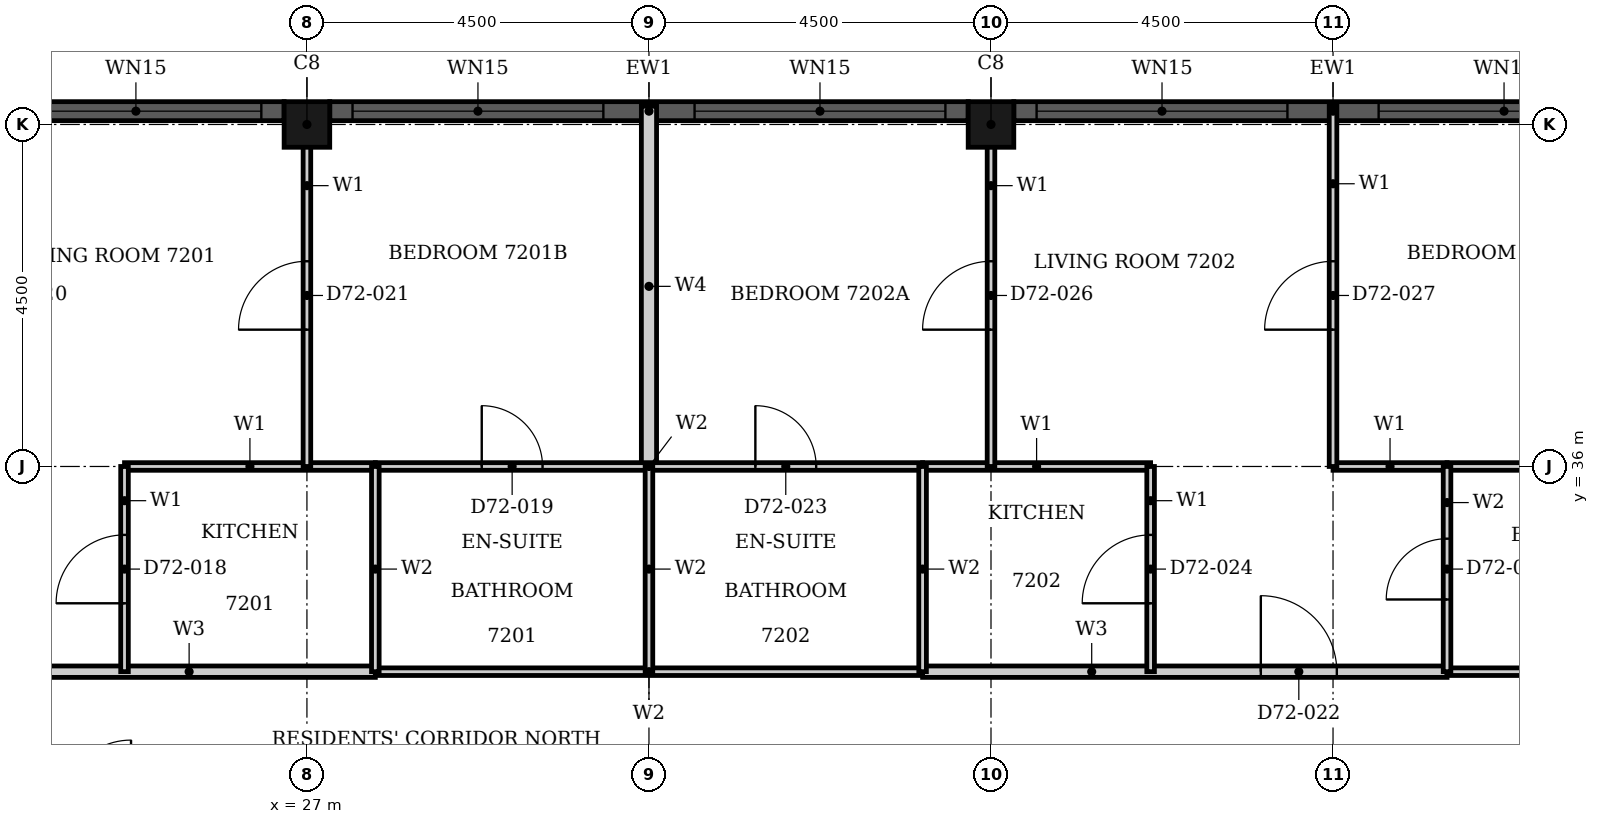
"""IFC4 building model, lengths in metres.
Left out: names, types, materials, properties, quantities, classifications, styles, units other than length and angle.
Written with IfcOpenShell. Run it as: python <this file> out.ifc"""

import sys

from ifc_helpers import new_model, si_unit, direction, frame, frame_2d, origin, origin_2d, place, context, subcontext, project, spatial, rectangle, hollow_rectangle, extrude, element, fill, save


model = new_model("IFC4")
c1 = context("Model", 3, precision=1e-05, world=origin(), true_north=direction((0.0, 1.0)))
c2 = subcontext(c1, "Body", "Model", "MODEL_VIEW")
j1 = project(units=[si_unit("LENGTHUNIT", "METRE"), si_unit("PLANEANGLEUNIT", "RADIAN")], contexts=[c1])
p1 = place(None, origin())
s1 = spatial("IfcSite", under=j1, at=p1, CompositionType="ELEMENT")
p2 = place(p1, origin())
s2 = spatial("IfcBuilding", under=s1, at=p2, CompositionType="ELEMENT")
p3 = place(p2, frame((0.0, 0.0, 283.4)))
s3 = spatial("IfcBuildingStorey", under=s2, at=p3, CompositionType="ELEMENT", Elevation=283.4)
for number, where, z_axis, x_axis in (
    (1, (36.0, 40.5, 0.0), (0.0, 0.0, 1.0), (1.0, 0.0, 0.0)),
    (2, (27.0, 40.5, 0.0), (0.0, 0.0, 1.0), (1.0, 0.0, 0.0)),
):
    element("IfcColumn", number, at=place(p3, frame(where, z_axis=z_axis, x_axis=x_axis)), inside=s3, PredefinedType="COLUMN", context=c2, shape_type="SweptSolid", body=[
        extrude(hollow_rectangle(XDim=0.6, YDim=0.6, WallThickness=0.02, at=origin_2d()), origin(), (0.0, 0.0, 1.0), 3.7),
    ])
p4 = place(p3, frame((44.7, 40.675, 0.0), z_axis=(0.0, 0.0, 1.0), x_axis=(-1.0, 0.0, 0.0)))
e3 = element("IfcWall", 3, at=p4, inside=s3, PredefinedType="SOLIDWALL", context=c2, shape_type="SweptSolid", body=[
    extrude(rectangle(XDim=8.4, YDim=0.25, at=frame_2d((4.2, 0.0))), origin(), (0.0, 0.0, 1.0), 3.7),
])
p5 = place(p4, frame((0.3, 0.0, 0.45)))
e4 = element("IfcOpeningElement", 4, at=p5, cuts=e3, PredefinedType="OPENING", context=c2, shape_type="SweptSolid", body=[
    extrude(rectangle(XDim=3.3, YDim=2.3, at=frame_2d((1.65, 1.15))), frame((0.0, 0.135, 0.0), z_axis=(0.0, -1.0, 0.0), x_axis=(1.0, 0.0, 0.0)), (0.0, 0.0, 1.0), 0.27),
])
p6 = place(p4, frame((4.8, 0.0, 0.45)))
e5 = element("IfcOpeningElement", 5, at=p6, cuts=e3, PredefinedType="OPENING", context=c2, shape_type="SweptSolid", body=[
    extrude(rectangle(XDim=3.3, YDim=2.3, at=frame_2d((1.65, 1.15))), frame((0.0, 0.135, 0.0), z_axis=(0.0, -1.0, 0.0), x_axis=(1.0, 0.0, 0.0)), (0.0, 0.0, 1.0), 0.27),
])
p7 = place(p3, frame((35.7, 40.675, 0.0), z_axis=(0.0, 0.0, 1.0), x_axis=(-1.0, 0.0, 0.0)))
e6 = element("IfcWall", 6, at=p7, inside=s3, PredefinedType="SOLIDWALL", context=c2, shape_type="SweptSolid", body=[
    extrude(rectangle(XDim=8.4, YDim=0.25, at=frame_2d((4.2, 0.0))), origin(), (0.0, 0.0, 1.0), 3.7),
])
p8 = place(p7, frame((0.3, 0.0, 0.45)))
e7 = element("IfcOpeningElement", 7, at=p8, cuts=e6, PredefinedType="OPENING", context=c2, shape_type="SweptSolid", body=[
    extrude(rectangle(XDim=3.3, YDim=2.3, at=frame_2d((1.65, 1.15))), frame((0.0, 0.135, 0.0), z_axis=(0.0, -1.0, 0.0), x_axis=(1.0, 0.0, 0.0)), (0.0, 0.0, 1.0), 0.27),
])
p9 = place(p7, frame((4.8, 0.0, 0.45)))
e8 = element("IfcOpeningElement", 8, at=p9, cuts=e6, PredefinedType="OPENING", context=c2, shape_type="SweptSolid", body=[
    extrude(rectangle(XDim=3.3, YDim=2.3, at=frame_2d((1.65, 1.15))), frame((0.0, 0.135, 0.0), z_axis=(0.0, -1.0, 0.0), x_axis=(1.0, 0.0, 0.0)), (0.0, 0.0, 1.0), 0.27),
])
p10 = place(p3, frame((26.7, 40.675, 0.0), z_axis=(0.0, 0.0, 1.0), x_axis=(-1.0, 0.0, 0.0)))
e9 = element("IfcWall", 9, at=p10, inside=s3, PredefinedType="SOLIDWALL", context=c2, shape_type="SweptSolid", body=[
    extrude(rectangle(XDim=8.4, YDim=0.25, at=frame_2d((4.2, 0.0))), origin(), (0.0, 0.0, 1.0), 3.7),
])
p11 = place(p10, frame((0.3, 0.0, 0.45)))
e10 = element("IfcOpeningElement", 10, at=p11, cuts=e9, PredefinedType="OPENING", context=c2, shape_type="SweptSolid", body=[
    extrude(rectangle(XDim=3.3, YDim=2.3, at=frame_2d((1.65, 1.15))), frame((0.0, 0.135, 0.0), z_axis=(0.0, -1.0, 0.0), x_axis=(1.0, 0.0, 0.0)), (0.0, 0.0, 1.0), 0.27),
])
p12 = place(p10, frame((4.8, 0.0, 0.45)))
e11 = element("IfcOpeningElement", 11, at=p12, cuts=e9, PredefinedType="OPENING", context=c2, shape_type="SweptSolid", body=[
    extrude(rectangle(XDim=3.3, YDim=2.3, at=frame_2d((1.65, 1.15))), frame((0.0, 0.135, 0.0), z_axis=(0.0, -1.0, 0.0), x_axis=(1.0, 0.0, 0.0)), (0.0, 0.0, 1.0), 0.27),
])
p13 = place(p3, frame((20.4, 33.3, 0.0), z_axis=(0.0, 0.0, 1.0), x_axis=(1.0, 0.0, 0.0)))
e12 = element("IfcWall", 12, at=p13, inside=s3, PredefinedType="PARTITIONING", context=c2, shape_type="SweptSolid", body=[
    extrude(rectangle(XDim=7.5, YDim=0.15, at=frame_2d((3.75, 0.0))), origin(), (0.0, 0.0, 1.0), 3.4),
])
p14 = place(p13, frame((1.6, 0.0, 0.0)))
e13 = element("IfcOpeningElement", 13, at=p14, cuts=e12, PredefinedType="OPENING", context=c2, shape_type="SweptSolid", body=[
    extrude(rectangle(XDim=1.0, YDim=2.2, at=frame_2d((0.5, 1.1))), frame((0.0, 0.085, 0.0), z_axis=(0.0, -1.0, 0.0), x_axis=(1.0, 0.0, 0.0)), (0.0, 0.0, 1.0), 0.17),
])
p15 = place(p3, frame((35.1, 33.3, 0.0), z_axis=(0.0, 0.0, 1.0), x_axis=(1.0, 0.0, 0.0)))
e14 = element("IfcWall", 14, at=p15, inside=s3, PredefinedType="PARTITIONING", context=c2, shape_type="SweptSolid", body=[
    extrude(rectangle(XDim=6.9, YDim=0.15, at=frame_2d((3.45, 0.0))), origin(), (0.0, 0.0, 1.0), 3.4),
])
p16 = place(p15, frame((4.45, 0.0, 0.0)))
e15 = element("IfcOpeningElement", 15, at=p16, cuts=e14, PredefinedType="OPENING", context=c2, shape_type="SweptSolid", body=[
    extrude(rectangle(XDim=1.0, YDim=2.2, at=frame_2d((0.5, 1.1))), frame((0.0, 0.085, 0.0), z_axis=(0.0, -1.0, 0.0), x_axis=(1.0, 0.0, 0.0)), (0.0, 0.0, 1.0), 0.17),
])
p17 = place(p3, frame((24.6, 36.0, 0.0), z_axis=(0.0, 0.0, 1.0), x_axis=(1.0, 0.0, 0.0)))
e16 = element("IfcWall", 16, at=p17, inside=s3, PredefinedType="PARTITIONING", context=c2, shape_type="SweptSolid", body=[
    extrude(rectangle(XDim=3.3, YDim=0.1, at=frame_2d((1.65, 0.0))), origin(), (0.0, 0.0, 1.0), 3.4),
])
p18 = place(p3, frame((40.5, 36.0, 0.0), z_axis=(0.0, 0.0, 1.0), x_axis=(1.0, 0.0, 0.0)))
e17 = element("IfcWall", 17, at=p18, inside=s3, PredefinedType="PARTITIONING", context=c2, shape_type="SweptSolid", body=[
    extrude(rectangle(XDim=1.5, YDim=0.1, at=frame_2d((0.75, 0.0))), origin(), (0.0, 0.0, 1.0), 3.4),
])
p19 = place(p3, frame((35.1, 36.0, 0.0), z_axis=(0.0, 0.0, 1.0), x_axis=(1.0, 0.0, 0.0)))
e18 = element("IfcWall", 18, at=p19, inside=s3, PredefinedType="PARTITIONING", context=c2, shape_type="SweptSolid", body=[
    extrude(rectangle(XDim=3.0, YDim=0.1, at=frame_2d((1.5, 0.0))), origin(), (0.0, 0.0, 1.0), 3.4),
])
p20 = place(p3, frame((24.6, 33.3, 0.0), z_axis=(0.0, 0.0, 1.0), x_axis=(0.0, 1.0, 0.0)))
e19 = element("IfcWall", 19, at=p20, inside=s3, PredefinedType="PARTITIONING", context=c2, shape_type="SweptSolid", body=[
    extrude(rectangle(XDim=2.7, YDim=0.1, at=frame_2d((1.35, 0.0))), origin(), (0.0, 0.0, 1.0), 3.4),
])
p21 = place(p20, frame((0.9, 0.0, 0.0)))
e20 = element("IfcOpeningElement", 20, at=p21, cuts=e19, PredefinedType="OPENING", context=c2, shape_type="SweptSolid", body=[
    extrude(rectangle(XDim=0.9, YDim=2.1, at=frame_2d((0.45, 1.05))), frame((0.0, 0.06, 0.0), z_axis=(0.0, -1.0, 0.0), x_axis=(1.0, 0.0, 0.0)), (0.0, 0.0, 1.0), 0.12),
])
p22 = place(p3, frame((27.0, 36.0, 0.0), z_axis=(0.0, 0.0, 1.0), x_axis=(0.0, 1.0, 0.0)))
e21 = element("IfcWall", 21, at=p22, inside=s3, PredefinedType="PARTITIONING", context=c2, shape_type="SweptSolid", body=[
    extrude(rectangle(XDim=4.69, YDim=0.1, at=frame_2d((2.345, 0.0))), origin(), (0.0, 0.0, 1.0), 3.4),
])
p23 = place(p22, frame((1.8, 0.0, 0.0)))
e22 = element("IfcOpeningElement", 22, at=p23, cuts=e21, PredefinedType="OPENING", context=c2, shape_type="SweptSolid", body=[
    extrude(rectangle(XDim=0.9, YDim=2.1, at=frame_2d((0.45, 1.05))), frame((0.0, 0.06, 0.0), z_axis=(0.0, -1.0, 0.0), x_axis=(1.0, 0.0, 0.0)), (0.0, 0.0, 1.0), 0.12),
])
p24 = place(p3, frame((36.0, 36.0, 0.0), z_axis=(0.0, 0.0, 1.0), x_axis=(0.0, 1.0, 0.0)))
e23 = element("IfcWall", 23, at=p24, inside=s3, PredefinedType="PARTITIONING", context=c2, shape_type="SweptSolid", body=[
    extrude(rectangle(XDim=4.69, YDim=0.1, at=frame_2d((2.345, 0.0))), origin(), (0.0, 0.0, 1.0), 3.4),
])
p25 = place(p24, frame((1.8, 0.0, 0.0)))
e24 = element("IfcOpeningElement", 24, at=p25, cuts=e23, PredefinedType="OPENING", context=c2, shape_type="SweptSolid", body=[
    extrude(rectangle(XDim=0.9, YDim=2.1, at=frame_2d((0.45, 1.05))), frame((0.0, 0.06, 0.0), z_axis=(0.0, -1.0, 0.0), x_axis=(1.0, 0.0, 0.0)), (0.0, 0.0, 1.0), 0.12),
])
p26 = place(p3, frame((38.1, 33.3, 0.0), z_axis=(0.0, 0.0, 1.0), x_axis=(0.0, 1.0, 0.0)))
e25 = element("IfcWall", 25, at=p26, inside=s3, PredefinedType="PARTITIONING", context=c2, shape_type="SweptSolid", body=[
    extrude(rectangle(XDim=2.7, YDim=0.1, at=frame_2d((1.35, 0.0))), origin(), (0.0, 0.0, 1.0), 3.4),
])
p27 = place(p26, frame((0.9, 0.0, 0.0)))
e26 = element("IfcOpeningElement", 26, at=p27, cuts=e25, PredefinedType="OPENING", context=c2, shape_type="SweptSolid", body=[
    extrude(rectangle(XDim=0.9, YDim=2.1, at=frame_2d((0.45, 1.05))), frame((0.0, 0.06, 0.0), z_axis=(0.0, -1.0, 0.0), x_axis=(1.0, 0.0, 0.0)), (0.0, 0.0, 1.0), 0.12),
])
p28 = place(p3, frame((40.5, 36.0, 0.0), z_axis=(0.0, 0.0, 1.0), x_axis=(0.0, 1.0, 0.0)))
e27 = element("IfcWall", 27, at=p28, inside=s3, PredefinedType="PARTITIONING", context=c2, shape_type="SweptSolid", body=[
    extrude(rectangle(XDim=4.74, YDim=0.1, at=frame_2d((2.37, 0.0))), origin(), (0.0, 0.0, 1.0), 3.4),
])
p29 = place(p28, frame((1.8, 0.0, 0.0)))
e28 = element("IfcOpeningElement", 28, at=p29, cuts=e27, PredefinedType="OPENING", context=c2, shape_type="SweptSolid", body=[
    extrude(rectangle(XDim=0.9, YDim=2.1, at=frame_2d((0.45, 1.05))), frame((0.0, 0.06, 0.0), z_axis=(0.0, -1.0, 0.0), x_axis=(1.0, 0.0, 0.0)), (0.0, 0.0, 1.0), 0.12),
])
p30 = place(p3, frame((31.5, 36.0, 0.0), z_axis=(0.0, 0.0, 1.0), x_axis=(0.0, 1.0, 0.0)))
e29 = element("IfcWall", 29, at=p30, inside=s3, PredefinedType="PARTITIONING", context=c2, shape_type="SweptSolid", body=[
    extrude(rectangle(XDim=4.74, YDim=0.2, at=frame_2d((2.37, 0.0))), origin(), (0.0, 0.0, 1.0), 3.4),
])
p31 = place(p3, frame((27.9, 33.3, 0.0), z_axis=(0.0, 0.0, 1.0), x_axis=(1.0, 0.0, 0.0)))
e30 = element("IfcWall", 30, at=p31, inside=s3, PredefinedType="PARTITIONING", context=c2, shape_type="SweptSolid", body=[
    extrude(rectangle(XDim=7.2, YDim=0.1, at=frame_2d((3.6, 0.0))), origin(), (0.0, 0.0, 1.0), 3.4),
])
p32 = place(p3, frame((42.0, 33.3, 0.0), z_axis=(0.0, 0.0, 1.0), x_axis=(1.0, 0.0, 0.0)))
e31 = element("IfcWall", 31, at=p32, inside=s3, PredefinedType="PARTITIONING", context=c2, shape_type="SweptSolid", body=[
    extrude(rectangle(XDim=3.0, YDim=0.1, at=frame_2d((1.5, 0.0))), origin(), (0.0, 0.0, 1.0), 3.4),
])
p33 = place(p3, frame((27.9, 36.0, 0.0), z_axis=(0.0, 0.0, 1.0), x_axis=(1.0, 0.0, 0.0)))
e32 = element("IfcWall", 32, at=p33, inside=s3, PredefinedType="PARTITIONING", context=c2, shape_type="SweptSolid", body=[
    extrude(rectangle(XDim=7.2, YDim=0.1, at=frame_2d((3.6, 0.0))), origin(), (0.0, 0.0, 1.0), 3.4),
])
p34 = place(p33, frame((1.4, 0.0, 0.0)))
e33 = element("IfcOpeningElement", 33, at=p34, cuts=e32, PredefinedType="OPENING", context=c2, shape_type="SweptSolid", body=[
    extrude(rectangle(XDim=0.8, YDim=2.1, at=frame_2d((0.4, 1.05))), frame((0.0, 0.06, 0.0), z_axis=(0.0, -1.0, 0.0), x_axis=(1.0, 0.0, 0.0)), (0.0, 0.0, 1.0), 0.12),
])
p35 = place(p33, frame((5.0, 0.0, 0.0)))
e34 = element("IfcOpeningElement", 34, at=p35, cuts=e32, PredefinedType="OPENING", context=c2, shape_type="SweptSolid", body=[
    extrude(rectangle(XDim=0.8, YDim=2.1, at=frame_2d((0.4, 1.05))), frame((0.0, 0.06, 0.0), z_axis=(0.0, -1.0, 0.0), x_axis=(1.0, 0.0, 0.0)), (0.0, 0.0, 1.0), 0.12),
])
p36 = place(p3, frame((42.0, 36.0, 0.0), z_axis=(0.0, 0.0, 1.0), x_axis=(1.0, 0.0, 0.0)))
e35 = element("IfcWall", 35, at=p36, inside=s3, PredefinedType="PARTITIONING", context=c2, shape_type="SweptSolid", body=[
    extrude(rectangle(XDim=3.0, YDim=0.1, at=frame_2d((1.5, 0.0))), origin(), (0.0, 0.0, 1.0), 3.4),
])
for number, where, z_axis, x_axis in (
    (36, (27.9, 33.3, 0.0), (0.0, 0.0, 1.0), (0.0, 1.0, 0.0)),
    (37, (31.5, 33.3, 0.0), (0.0, 0.0, 1.0), (0.0, 1.0, 0.0)),
    (38, (35.1, 33.3, 0.0), (0.0, 0.0, 1.0), (0.0, 1.0, 0.0)),
):
    element("IfcWall", number, at=place(p3, frame(where, z_axis=z_axis, x_axis=x_axis)), inside=s3, PredefinedType="PARTITIONING", context=c2, shape_type="SweptSolid", body=[
        extrude(rectangle(XDim=2.7, YDim=0.1, at=frame_2d((1.35, 0.0))), origin(), (0.0, 0.0, 1.0), 3.4),
    ])
p37 = place(p3, frame((42.0, 33.3, 0.0), z_axis=(0.0, 0.0, 1.0), x_axis=(0.0, 1.0, 0.0)))
e39 = element("IfcWall", 39, at=p37, inside=s3, PredefinedType="PARTITIONING", context=c2, shape_type="SweptSolid", body=[
    extrude(rectangle(XDim=2.7, YDim=0.1, at=frame_2d((1.35, 0.0))), origin(), (0.0, 0.0, 1.0), 3.4),
])
p38 = place(p37, frame((0.95, 0.0, 0.0)))
e40 = element("IfcOpeningElement", 40, at=p38, cuts=e39, PredefinedType="OPENING", context=c2, shape_type="SweptSolid", body=[
    extrude(rectangle(XDim=0.8, YDim=2.1, at=frame_2d((0.4, 1.05))), frame((0.0, 0.06, 0.0), z_axis=(0.0, -1.0, 0.0), x_axis=(1.0, 0.0, 0.0)), (0.0, 0.0, 1.0), 0.12),
])
p39 = place(p5, origin())
e41 = element("IfcWindow", 41, at=p39, inside=s3, PartitioningType="SINGLE_PANEL", PredefinedType="WINDOW", context=c2, shape_type="SweptSolid", body=[
    extrude(rectangle(XDim=3.3, YDim=2.3, at=frame_2d((1.65, 1.15))), frame((0.0, 0.03, 0.0), z_axis=(0.0, -1.0, 0.0), x_axis=(1.0, 0.0, 0.0)), (0.0, 0.0, 1.0), 0.06),
])
fill(e4, e41)
p40 = place(p6, origin())
e42 = element("IfcWindow", 42, at=p40, inside=s3, PartitioningType="SINGLE_PANEL", PredefinedType="WINDOW", context=c2, shape_type="SweptSolid", body=[
    extrude(rectangle(XDim=3.3, YDim=2.3, at=frame_2d((1.65, 1.15))), frame((0.0, 0.03, 0.0), z_axis=(0.0, -1.0, 0.0), x_axis=(1.0, 0.0, 0.0)), (0.0, 0.0, 1.0), 0.06),
])
fill(e5, e42)
p41 = place(p8, origin())
e43 = element("IfcWindow", 43, at=p41, inside=s3, PartitioningType="SINGLE_PANEL", PredefinedType="WINDOW", context=c2, shape_type="SweptSolid", body=[
    extrude(rectangle(XDim=3.3, YDim=2.3, at=frame_2d((1.65, 1.15))), frame((0.0, 0.03, 0.0), z_axis=(0.0, -1.0, 0.0), x_axis=(1.0, 0.0, 0.0)), (0.0, 0.0, 1.0), 0.06),
])
fill(e7, e43)
p42 = place(p9, origin())
e44 = element("IfcWindow", 44, at=p42, inside=s3, PartitioningType="SINGLE_PANEL", PredefinedType="WINDOW", context=c2, shape_type="SweptSolid", body=[
    extrude(rectangle(XDim=3.3, YDim=2.3, at=frame_2d((1.65, 1.15))), frame((0.0, 0.03, 0.0), z_axis=(0.0, -1.0, 0.0), x_axis=(1.0, 0.0, 0.0)), (0.0, 0.0, 1.0), 0.06),
])
fill(e8, e44)
p43 = place(p11, origin())
e45 = element("IfcWindow", 45, at=p43, inside=s3, PartitioningType="SINGLE_PANEL", PredefinedType="WINDOW", context=c2, shape_type="SweptSolid", body=[
    extrude(rectangle(XDim=3.3, YDim=2.3, at=frame_2d((1.65, 1.15))), frame((0.0, 0.03, 0.0), z_axis=(0.0, -1.0, 0.0), x_axis=(1.0, 0.0, 0.0)), (0.0, 0.0, 1.0), 0.06),
])
fill(e10, e45)
p44 = place(p21, origin())
e46 = element("IfcDoor", 46, at=p44, inside=s3, OperationType="SINGLE_SWING_LEFT", PredefinedType="DOOR", context=c2, shape_type="SweptSolid", body=[
    extrude(rectangle(XDim=0.9, YDim=2.1, at=frame_2d((0.45, 1.05))), frame((0.0, 0.025, 0.0), z_axis=(0.0, -1.0, 0.0), x_axis=(1.0, 0.0, 0.0)), (0.0, 0.0, 1.0), 0.05),
])
fill(e20, e46)
p45 = place(p34, origin())
e47 = element("IfcDoor", 47, at=p45, inside=s3, OperationType="SINGLE_SWING_RIGHT", PredefinedType="DOOR", context=c2, shape_type="SweptSolid", body=[
    extrude(rectangle(XDim=0.8, YDim=2.1, at=frame_2d((0.4, 1.05))), frame((0.0, 0.025, 0.0), z_axis=(0.0, -1.0, 0.0), x_axis=(1.0, 0.0, 0.0)), (0.0, 0.0, 1.0), 0.05),
])
fill(e33, e47)
p46 = place(p23, origin())
e48 = element("IfcDoor", 48, at=p46, inside=s3, OperationType="SINGLE_SWING_RIGHT", PredefinedType="DOOR", context=c2, shape_type="SweptSolid", body=[
    extrude(rectangle(XDim=0.9, YDim=2.1, at=frame_2d((0.45, 1.05))), frame((0.0, 0.025, 0.0), z_axis=(0.0, -1.0, 0.0), x_axis=(1.0, 0.0, 0.0)), (0.0, 0.0, 1.0), 0.05),
])
fill(e22, e48)
p47 = place(p16, origin())
e49 = element("IfcDoor", 49, at=p47, inside=s3, OperationType="SINGLE_SWING_LEFT", PredefinedType="DOOR", context=c2, shape_type="SweptSolid", body=[
    extrude(rectangle(XDim=1.0, YDim=2.2, at=frame_2d((0.5, 1.1))), frame((0.0, 0.025, 0.0), z_axis=(0.0, -1.0, 0.0), x_axis=(1.0, 0.0, 0.0)), (0.0, 0.0, 1.0), 0.05),
])
fill(e15, e49)
p48 = place(p35, origin())
e50 = element("IfcDoor", 50, at=p48, inside=s3, OperationType="SINGLE_SWING_LEFT", PredefinedType="DOOR", context=c2, shape_type="SweptSolid", body=[
    extrude(rectangle(XDim=0.8, YDim=2.1, at=frame_2d((0.4, 1.05))), frame((0.0, 0.025, 0.0), z_axis=(0.0, -1.0, 0.0), x_axis=(1.0, 0.0, 0.0)), (0.0, 0.0, 1.0), 0.05),
])
fill(e34, e50)
p49 = place(p27, origin())
e51 = element("IfcDoor", 51, at=p49, inside=s3, OperationType="SINGLE_SWING_LEFT", PredefinedType="DOOR", context=c2, shape_type="SweptSolid", body=[
    extrude(rectangle(XDim=0.9, YDim=2.1, at=frame_2d((0.45, 1.05))), frame((0.0, 0.025, 0.0), z_axis=(0.0, -1.0, 0.0), x_axis=(1.0, 0.0, 0.0)), (0.0, 0.0, 1.0), 0.05),
])
fill(e26, e51)
p50 = place(p38, origin())
e52 = element("IfcDoor", 52, at=p50, inside=s3, OperationType="SINGLE_SWING_RIGHT", PredefinedType="DOOR", context=c2, shape_type="SweptSolid", body=[
    extrude(rectangle(XDim=0.8, YDim=2.1, at=frame_2d((0.4, 1.05))), frame((0.0, 0.025, 0.0), z_axis=(0.0, -1.0, 0.0), x_axis=(1.0, 0.0, 0.0)), (0.0, 0.0, 1.0), 0.05),
])
fill(e40, e52)
p51 = place(p25, origin())
e53 = element("IfcDoor", 53, at=p51, inside=s3, OperationType="SINGLE_SWING_RIGHT", PredefinedType="DOOR", context=c2, shape_type="SweptSolid", body=[
    extrude(rectangle(XDim=0.9, YDim=2.1, at=frame_2d((0.45, 1.05))), frame((0.0, 0.025, 0.0), z_axis=(0.0, -1.0, 0.0), x_axis=(1.0, 0.0, 0.0)), (0.0, 0.0, 1.0), 0.05),
])
fill(e24, e53)
p52 = place(p29, origin())
e54 = element("IfcDoor", 54, at=p52, inside=s3, OperationType="SINGLE_SWING_RIGHT", PredefinedType="DOOR", context=c2, shape_type="SweptSolid", body=[
    extrude(rectangle(XDim=0.9, YDim=2.1, at=frame_2d((0.45, 1.05))), frame((0.0, 0.025, 0.0), z_axis=(0.0, -1.0, 0.0), x_axis=(1.0, 0.0, 0.0)), (0.0, 0.0, 1.0), 0.05),
])
fill(e28, e54)
save(model, sys.argv[1])
